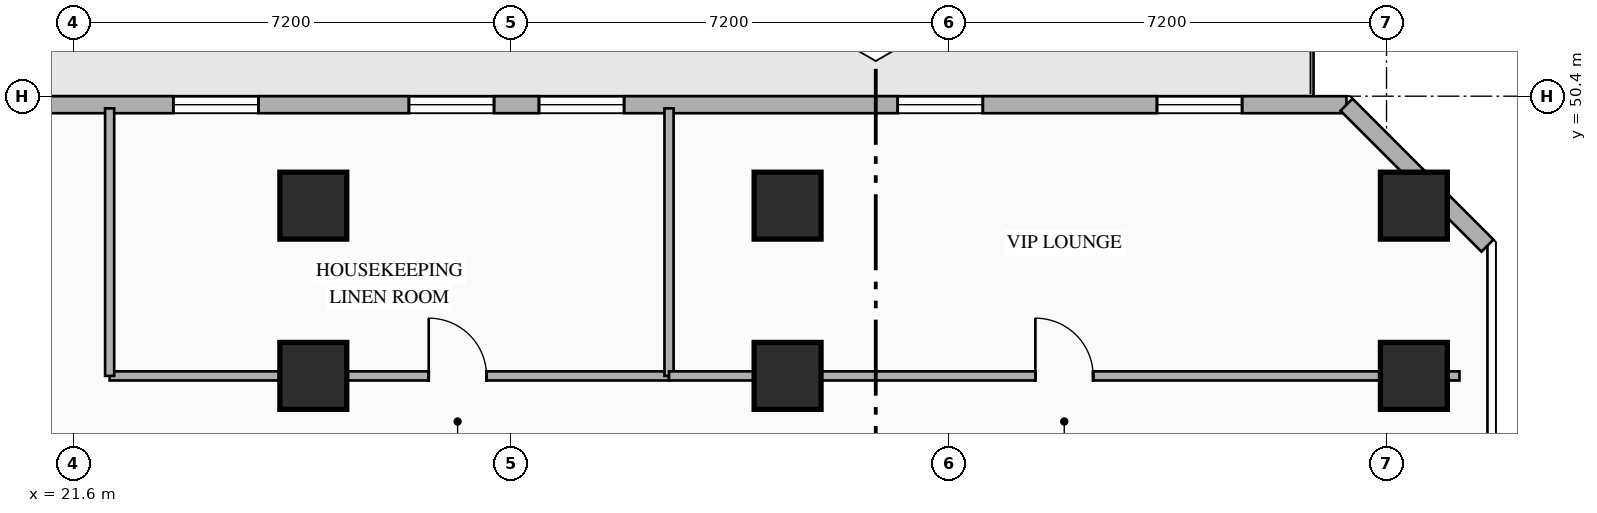
"""IFC4 building model, lengths in metres.
Left out: names, types, materials, properties, quantities, classifications, styles, units other than length and angle.
Written with IfcOpenShell. Run it as: python <this file> out.ifc"""

import sys

from ifc_helpers import new_model, si_unit, direction, frame, frame_2d, origin, origin_2d, place, context, subcontext, project, spatial, rectangle, hollow_rectangle, extrude, element, fill, save


model = new_model("IFC4")
c1 = context("Model", 3, precision=1e-05, world=origin(), true_north=direction((0.0, 1.0)))
c2 = subcontext(c1, "Body", "Model", "MODEL_VIEW")
j1 = project(units=[si_unit("LENGTHUNIT", "METRE"), si_unit("PLANEANGLEUNIT", "RADIAN")], contexts=[c1])
p1 = place(None, origin())
s1 = spatial("IfcSite", under=j1, at=p1, CompositionType="ELEMENT")
p2 = place(p1, origin())
s2 = spatial("IfcBuilding", under=s1, at=p2, CompositionType="ELEMENT")
p3 = place(p2, frame((0.0, 0.0, 66.75)))
s3 = spatial("IfcBuildingStorey", under=s2, at=p3, CompositionType="ELEMENT", Elevation=66.75)
for number, where, z_axis, x_axis in (
    (1, (25.55, 45.8, 0.0), (0.0, 0.0, 1.0), (1.0, 0.0, 0.0)),
    (2, (33.35, 45.8, 0.0), (0.0, 0.0, 1.0), (1.0, 0.0, 0.0)),
    (3, (43.65, 45.8, 0.0), (0.0, 0.0, 1.0), (1.0, 0.0, 0.0)),
    (4, (25.55, 48.6, 0.0), (0.0, 0.0, 1.0), (1.0, 0.0, 0.0)),
    (5, (33.35, 48.6, 0.0), (0.0, 0.0, 1.0), (1.0, 0.0, 0.0)),
    (6, (43.65, 48.6, 0.0), (0.0, 0.0, 1.0), (1.0, 0.0, 0.0)),
):
    element("IfcColumn", number, at=place(p3, frame(where, z_axis=z_axis, x_axis=x_axis)), inside=s3, PredefinedType="COLUMN", context=c2, shape_type="SweptSolid", body=[
        extrude(hollow_rectangle(XDim=1.1, YDim=1.1, WallThickness=0.04, at=origin_2d()), origin(), (0.0, 0.0, 1.0), 3.35),
    ])
p4 = place(p3, frame((2.458, 50.26, 0.0), z_axis=(0.0, 0.0, 1.0), x_axis=(1.0, 0.0, 0.0)))
e7 = element("IfcWall", 7, at=p4, inside=s3, PredefinedType="STANDARD", context=c2, shape_type="SweptSolid", body=[
    extrude(rectangle(XDim=40.084, YDim=0.28, at=frame_2d((20.042, 0.0))), origin(), (0.0, 0.0, 1.0), 3.09),
])
p5 = place(p4, frame((4.26, 0.0, 0.0)))
e8 = element("IfcOpeningElement", 8, at=p5, cuts=e7, PredefinedType="OPENING", context=c2, shape_type="SweptSolid", body=[
    extrude(rectangle(XDim=1.1, YDim=2.2, at=frame_2d((0.55, 1.1))), frame((0.0, 0.15, 0.0), z_axis=(0.0, -1.0, 0.0), x_axis=(1.0, 0.0, 0.0)), (0.0, 0.0, 1.0), 0.3),
])
p6 = place(p4, frame((1.717, 0.0, 0.85)))
e9 = element("IfcOpeningElement", 9, at=p6, cuts=e7, PredefinedType="OPENING", context=c2, shape_type="SweptSolid", body=[
    extrude(rectangle(XDim=1.4, YDim=1.8, at=frame_2d((0.7, 0.9))), frame((0.0, 0.15, 0.0), z_axis=(0.0, -1.0, 0.0), x_axis=(1.0, 0.0, 0.0)), (0.0, 0.0, 1.0), 0.3),
])
p7 = place(p4, frame((10.0, 0.0, 0.85)))
e10 = element("IfcOpeningElement", 10, at=p7, cuts=e7, PredefinedType="OPENING", context=c2, shape_type="SweptSolid", body=[
    extrude(rectangle(XDim=1.4, YDim=1.8, at=frame_2d((0.7, 0.9))), frame((0.0, 0.15, 0.0), z_axis=(0.0, -1.0, 0.0), x_axis=(1.0, 0.0, 0.0)), (0.0, 0.0, 1.0), 0.3),
])
p8 = place(p4, frame((14.02, 0.0, 0.85)))
e11 = element("IfcOpeningElement", 11, at=p8, cuts=e7, PredefinedType="OPENING", context=c2, shape_type="SweptSolid", body=[
    extrude(rectangle(XDim=1.4, YDim=1.8, at=frame_2d((0.7, 0.9))), frame((0.0, 0.15, 0.0), z_axis=(0.0, -1.0, 0.0), x_axis=(1.0, 0.0, 0.0)), (0.0, 0.0, 1.0), 0.3),
])
p9 = place(p4, frame((20.789, 0.0, 0.85)))
e12 = element("IfcOpeningElement", 12, at=p9, cuts=e7, PredefinedType="OPENING", context=c2, shape_type="SweptSolid", body=[
    extrude(rectangle(XDim=1.4, YDim=1.8, at=frame_2d((0.7, 0.9))), frame((0.0, 0.15, 0.0), z_axis=(0.0, -1.0, 0.0), x_axis=(1.0, 0.0, 0.0)), (0.0, 0.0, 1.0), 0.3),
])
p10 = place(p4, frame((24.664, 0.0, 0.85)))
e13 = element("IfcOpeningElement", 13, at=p10, cuts=e7, PredefinedType="OPENING", context=c2, shape_type="SweptSolid", body=[
    extrude(rectangle(XDim=1.4, YDim=1.8, at=frame_2d((0.7, 0.9))), frame((0.0, 0.15, 0.0), z_axis=(0.0, -1.0, 0.0), x_axis=(1.0, 0.0, 0.0)), (0.0, 0.0, 1.0), 0.3),
])
p11 = place(p4, frame((26.803, 0.0, 0.85)))
e14 = element("IfcOpeningElement", 14, at=p11, cuts=e7, PredefinedType="OPENING", context=c2, shape_type="SweptSolid", body=[
    extrude(rectangle(XDim=1.4, YDim=1.8, at=frame_2d((0.7, 0.9))), frame((0.0, 0.15, 0.0), z_axis=(0.0, -1.0, 0.0), x_axis=(1.0, 0.0, 0.0)), (0.0, 0.0, 1.0), 0.3),
])
p12 = place(p4, frame((32.703, 0.0, 0.85)))
e15 = element("IfcOpeningElement", 15, at=p12, cuts=e7, PredefinedType="OPENING", context=c2, shape_type="SweptSolid", body=[
    extrude(rectangle(XDim=1.4, YDim=1.8, at=frame_2d((0.7, 0.9))), frame((0.0, 0.15, 0.0), z_axis=(0.0, -1.0, 0.0), x_axis=(1.0, 0.0, 0.0)), (0.0, 0.0, 1.0), 0.3),
])
p13 = place(p4, frame((36.967, 0.0, 0.85)))
e16 = element("IfcOpeningElement", 16, at=p13, cuts=e7, PredefinedType="OPENING", context=c2, shape_type="SweptSolid", body=[
    extrude(rectangle(XDim=1.4, YDim=1.8, at=frame_2d((0.7, 0.9))), frame((0.0, 0.15, 0.0), z_axis=(0.0, -1.0, 0.0), x_axis=(1.0, 0.0, 0.0)), (0.0, 0.0, 1.0), 0.3),
])
p14 = place(p3, frame((42.542, 50.26, 0.0), z_axis=(0.0, 0.0, 1.0), x_axis=(0.707106781187, -0.707106781187, 0.0)))
e17 = element("IfcWall", 17, at=p14, inside=s3, PredefinedType="STANDARD", context=c2, shape_type="SweptSolid", body=[
    extrude(rectangle(XDim=3.278, YDim=0.28, at=frame_2d((1.639, 0.0))), origin(), (0.0, 0.0, 1.0), 3.09),
])
p15 = place(p3, frame((22.2, 45.8, 0.0), z_axis=(0.0, 0.0, 1.0), x_axis=(1.0, 0.0, 0.0)))
e18 = element("IfcWall", 18, at=p15, inside=s3, PredefinedType="PARTITIONING", context=c2, shape_type="SweptSolid", body=[
    extrude(rectangle(XDim=9.2, YDim=0.15, at=frame_2d((4.6, 0.0))), origin(), (0.0, 0.0, 1.0), 2.425),
])
p16 = place(p15, frame((5.248, 0.0, 0.0)))
e19 = element("IfcOpeningElement", 19, at=p16, cuts=e18, PredefinedType="OPENING", context=c2, shape_type="SweptSolid", body=[
    extrude(rectangle(XDim=0.95, YDim=2.15, at=frame_2d((0.475, 1.075))), frame((0.0, 0.085, 0.0), z_axis=(0.0, -1.0, 0.0), x_axis=(1.0, 0.0, 0.0)), (0.0, 0.0, 1.0), 0.17),
])
for number, where, z_axis, x_axis in (
    (20, (22.2, 45.8, 0.0), (0.0, 0.0, 1.0), (0.0, 1.0, 0.0)),
    (21, (31.4, 45.8, 0.0), (0.0, 0.0, 1.0), (0.0, 1.0, 0.0)),
):
    element("IfcWall", number, at=place(p3, frame(where, z_axis=z_axis, x_axis=x_axis)), inside=s3, PredefinedType="PARTITIONING", context=c2, shape_type="SweptSolid", body=[
        extrude(rectangle(XDim=4.4, YDim=0.15, at=frame_2d((2.2, 0.0))), origin(), (0.0, 0.0, 1.0), 3.09),
    ])
p17 = place(p3, frame((31.4, 45.8, 0.0), z_axis=(0.0, 0.0, 1.0), x_axis=(1.0, 0.0, 0.0)))
e22 = element("IfcWall", 22, at=p17, inside=s3, PredefinedType="PARTITIONING", context=c2, shape_type="SweptSolid", body=[
    extrude(rectangle(XDim=13.0, YDim=0.15, at=frame_2d((6.5, 0.0))), origin(), (0.0, 0.0, 1.0), 2.425),
])
p18 = place(p17, frame((6.025, 0.0, 0.0)))
e23 = element("IfcOpeningElement", 23, at=p18, cuts=e22, PredefinedType="OPENING", context=c2, shape_type="SweptSolid", body=[
    extrude(rectangle(XDim=0.95, YDim=2.15, at=frame_2d((0.475, 1.075))), frame((0.0, 0.085, 0.0), z_axis=(0.0, -1.0, 0.0), x_axis=(1.0, 0.0, 0.0)), (0.0, 0.0, 1.0), 0.17),
])
p19 = place(p9, origin())
e24 = element("IfcWindow", 24, at=p19, inside=s3, PartitioningType="SINGLE_PANEL", PredefinedType="WINDOW", context=c2, shape_type="SweptSolid", body=[
    extrude(rectangle(XDim=1.4, YDim=1.8, at=frame_2d((0.7, 0.9))), frame((0.0, 0.03, 0.0), z_axis=(0.0, -1.0, 0.0), x_axis=(1.0, 0.0, 0.0)), (0.0, 0.0, 1.0), 0.06),
])
fill(e12, e24)
p20 = place(p10, origin())
e25 = element("IfcWindow", 25, at=p20, inside=s3, PartitioningType="SINGLE_PANEL", PredefinedType="WINDOW", context=c2, shape_type="SweptSolid", body=[
    extrude(rectangle(XDim=1.4, YDim=1.8, at=frame_2d((0.7, 0.9))), frame((0.0, 0.03, 0.0), z_axis=(0.0, -1.0, 0.0), x_axis=(1.0, 0.0, 0.0)), (0.0, 0.0, 1.0), 0.06),
])
fill(e13, e25)
p21 = place(p11, origin())
e26 = element("IfcWindow", 26, at=p21, inside=s3, PartitioningType="SINGLE_PANEL", PredefinedType="WINDOW", context=c2, shape_type="SweptSolid", body=[
    extrude(rectangle(XDim=1.4, YDim=1.8, at=frame_2d((0.7, 0.9))), frame((0.0, 0.03, 0.0), z_axis=(0.0, -1.0, 0.0), x_axis=(1.0, 0.0, 0.0)), (0.0, 0.0, 1.0), 0.06),
])
fill(e14, e26)
p22 = place(p12, origin())
e27 = element("IfcWindow", 27, at=p22, inside=s3, PartitioningType="SINGLE_PANEL", PredefinedType="WINDOW", context=c2, shape_type="SweptSolid", body=[
    extrude(rectangle(XDim=1.4, YDim=1.8, at=frame_2d((0.7, 0.9))), frame((0.0, 0.03, 0.0), z_axis=(0.0, -1.0, 0.0), x_axis=(1.0, 0.0, 0.0)), (0.0, 0.0, 1.0), 0.06),
])
fill(e15, e27)
p23 = place(p13, origin())
e28 = element("IfcWindow", 28, at=p23, inside=s3, PartitioningType="SINGLE_PANEL", PredefinedType="WINDOW", context=c2, shape_type="SweptSolid", body=[
    extrude(rectangle(XDim=1.4, YDim=1.8, at=frame_2d((0.7, 0.9))), frame((0.0, 0.03, 0.0), z_axis=(0.0, -1.0, 0.0), x_axis=(1.0, 0.0, 0.0)), (0.0, 0.0, 1.0), 0.06),
])
fill(e16, e28)
p24 = place(p16, origin())
e29 = element("IfcDoor", 29, at=p24, inside=s3, OperationType="SINGLE_SWING_LEFT", PredefinedType="DOOR", context=c2, shape_type="SweptSolid", body=[
    extrude(rectangle(XDim=0.95, YDim=2.15, at=frame_2d((0.475, 1.075))), frame((0.0, 0.025, 0.0), z_axis=(0.0, -1.0, 0.0), x_axis=(1.0, 0.0, 0.0)), (0.0, 0.0, 1.0), 0.05),
])
fill(e19, e29)
p25 = place(p18, origin())
e30 = element("IfcDoor", 30, at=p25, inside=s3, OperationType="SINGLE_SWING_LEFT", PredefinedType="DOOR", context=c2, shape_type="SweptSolid", body=[
    extrude(rectangle(XDim=0.95, YDim=2.15, at=frame_2d((0.475, 1.075))), frame((0.0, 0.025, 0.0), z_axis=(0.0, -1.0, 0.0), x_axis=(1.0, 0.0, 0.0)), (0.0, 0.0, 1.0), 0.05),
])
fill(e23, e30)
save(model, sys.argv[1])
